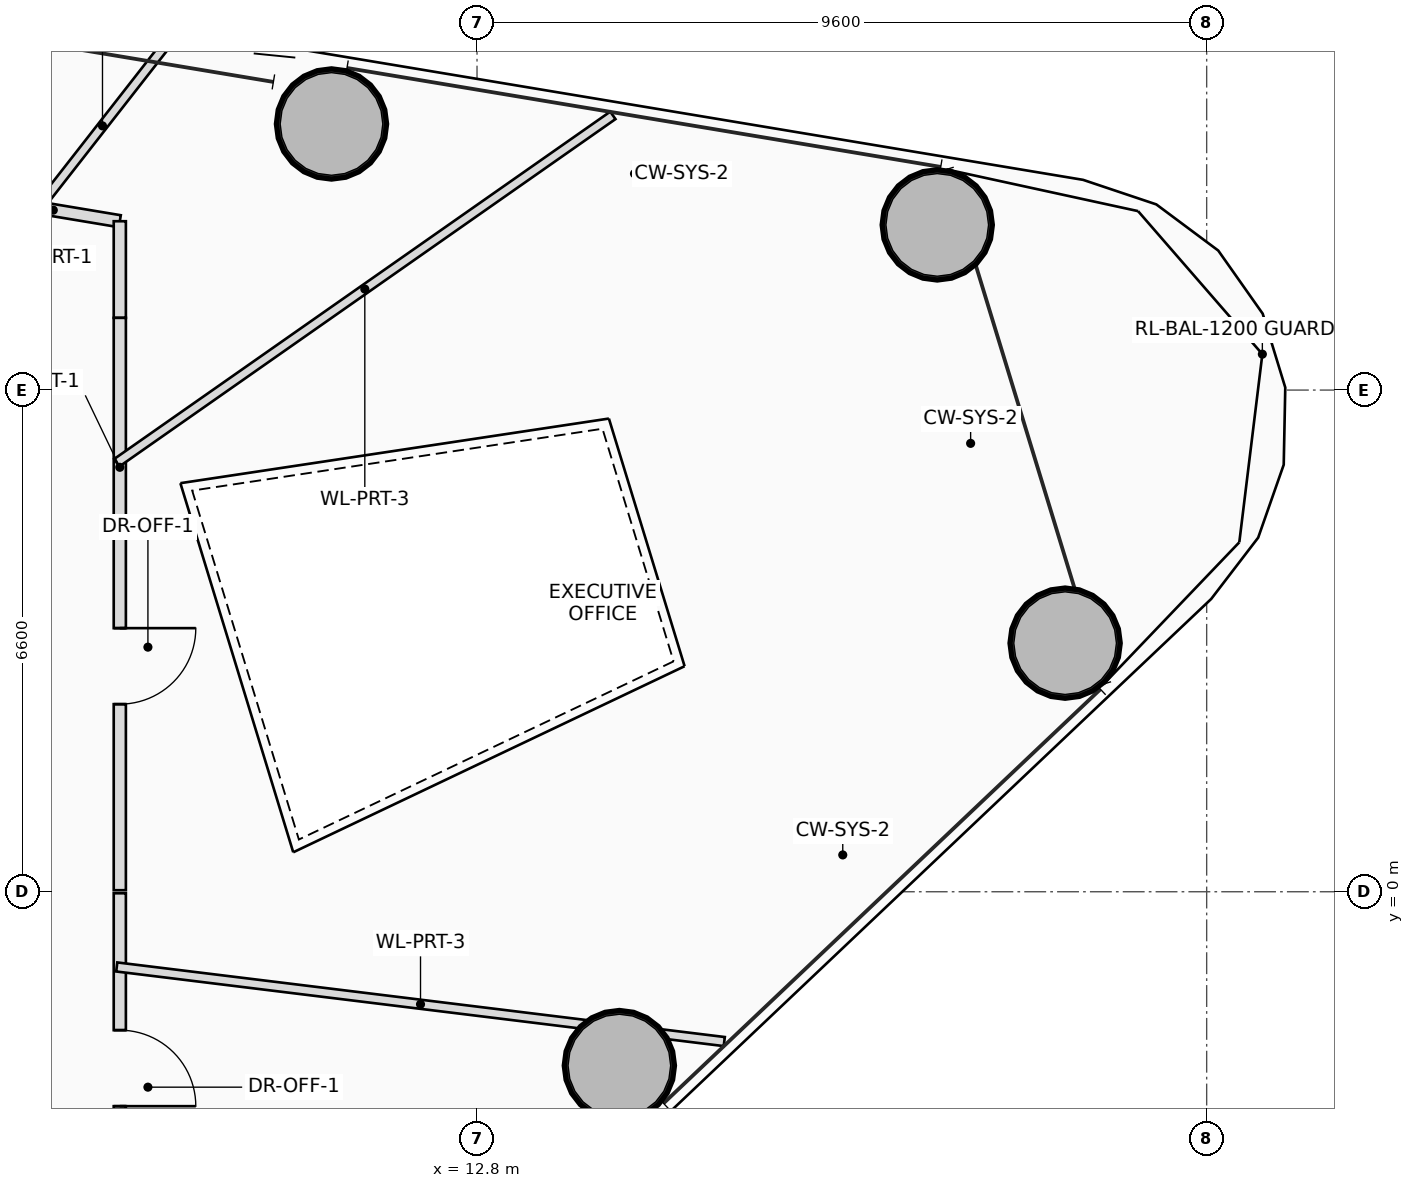
"""IFC4 building model, lengths in metres.
Left out: names, types, materials, properties, quantities, classifications, styles, units other than length and angle.
Written with IfcOpenShell. Run it as: python <this file> out.ifc"""

import sys

from ifc_helpers import new_model, si_unit, direction, frame, frame_2d, origin, origin_2d, place, context, subcontext, project, spatial, rectangle, hollow_circle, extrude, source, transform, mapped, element, fill, save


model = new_model("IFC4")
c1 = context("Model", 3, precision=1e-05, world=origin(), true_north=direction((0.0, 1.0)))
c2 = subcontext(c1, "Body", "Model", "MODEL_VIEW")
j1 = project(units=[si_unit("LENGTHUNIT", "METRE"), si_unit("PLANEANGLEUNIT", "RADIAN")], contexts=[c1])
p1 = place(None, origin())
s1 = spatial("IfcSite", under=j1, at=p1, CompositionType="ELEMENT")
p2 = place(p1, origin())
s2 = spatial("IfcBuilding", under=s1, at=p2, CompositionType="ELEMENT")
p3 = place(p2, frame((0.0, 0.0, 108.65)))
s3 = spatial("IfcBuildingStorey", under=s2, at=p3, CompositionType="ELEMENT", Elevation=108.65)
m1 = source(origin(), c2, "Body", "SweptSolid", [
    extrude(hollow_circle(Radius=0.725, WallThickness=0.05, at=origin_2d()), origin(), (0.0, 0.0, 1.0), 3.75),
])
for number, where, z_axis, x_axis in (
    (1, (14.673, -2.287, 0.0), (0.0, 0.0, 1.0), (1.0, 0.0, 0.0)),
    (2, (20.538, 3.271, 0.0), (0.0, 0.0, 1.0), (1.0, 0.0, 0.0)),
    (3, (18.855, 8.773, 0.0), (0.0, 0.0, 1.0), (1.0, 0.0, 0.0)),
    (4, (10.885, 10.101, 0.0), (0.0, 0.0, 1.0), (1.0, 0.0, 0.0)),
):
    element("IfcColumn", number, at=place(p3, frame(where, z_axis=z_axis, x_axis=x_axis)), inside=s3, PredefinedType="COLUMN", context=c2, shape_type="MappedRepresentation", body=[
        mapped(m1, transform((0.0, 0.0, 0.0), scale=1.0)),
    ])
p4 = place(p3, frame((6.35, 9.113, 0.0), z_axis=(0.0, 0.0, 1.0), x_axis=(0.986386484459, -0.164443617317, 0.0)))
e5 = element("IfcWall", 5, at=p4, inside=s3, PredefinedType="PARTITIONING", context=c2, shape_type="SweptSolid", body=[
    extrude(rectangle(XDim=1.774, YDim=0.16, at=frame_2d((0.887, 0.0))), origin(), (0.0, 0.0, 1.0), 3.2),
])
p5 = place(p3, frame((8.1, 8.821, 0.0), z_axis=(0.0, 0.0, 1.0), x_axis=(0.0, -1.0, 0.0)))
e6 = element("IfcWall", 6, at=p5, inside=s3, PredefinedType="PARTITIONING", context=c2, shape_type="SweptSolid", body=[
    extrude(rectangle(XDim=1.271, YDim=0.16, at=frame_2d((0.636, 0.0))), origin(), (0.0, 0.0, 1.0), 2.85),
])
p6 = place(p3, frame((8.1, 7.55, 0.0), z_axis=(0.0, 0.0, 1.0), x_axis=(0.0, -1.0, 0.0)))
e7 = element("IfcWall", 7, at=p6, inside=s3, PredefinedType="PARTITIONING", context=c2, shape_type="SweptSolid", body=[
    extrude(rectangle(XDim=7.53, YDim=0.16, at=frame_2d((3.765, 0.0))), origin(), (0.0, 0.0, 1.0), 2.85),
])
p7 = place(p6, frame((4.082, 0.0, 0.0)))
e8 = element("IfcOpeningElement", 8, at=p7, cuts=e7, PredefinedType="OPENING", context=c2, shape_type="SweptSolid", body=[
    extrude(rectangle(XDim=1.0, YDim=2.25, at=frame_2d((0.5, 1.125))), frame((0.0, 0.09, 0.0), z_axis=(0.0, -1.0, 0.0), x_axis=(1.0, 0.0, 0.0)), (0.0, 0.0, 1.0), 0.18),
])
p8 = place(p3, frame((8.1, -0.02, 0.0), z_axis=(0.0, 0.0, 1.0), x_axis=(0.0, -1.0, 0.0)))
e9 = element("IfcWall", 9, at=p8, inside=s3, PredefinedType="PARTITIONING", context=c2, shape_type="SweptSolid", body=[
    extrude(rectangle(XDim=6.126, YDim=0.16, at=frame_2d((3.063, 0.0))), origin(), (0.0, 0.0, 1.0), 2.85),
])
p9 = place(p8, frame((1.801, 0.0, 0.0)))
e10 = element("IfcOpeningElement", 10, at=p9, cuts=e9, PredefinedType="OPENING", context=c2, shape_type="SweptSolid", body=[
    extrude(rectangle(XDim=1.0, YDim=2.25, at=frame_2d((0.5, 1.125))), frame((0.0, 0.09, 0.0), z_axis=(0.0, -1.0, 0.0), x_axis=(1.0, 0.0, 0.0)), (0.0, 0.0, 1.0), 0.18),
])
p10 = place(p8, frame((4.284, 0.0, 0.0)))
e11 = element("IfcOpeningElement", 11, at=p10, cuts=e9, PredefinedType="OPENING", context=c2, shape_type="SweptSolid", body=[
    extrude(rectangle(XDim=1.0, YDim=2.25, at=frame_2d((0.5, 1.125))), frame((0.0, 0.09, 0.0), z_axis=(0.0, -1.0, 0.0), x_axis=(1.0, 0.0, 0.0)), (0.0, 0.0, 1.0), 0.18),
])
p11 = place(p3, frame((8.06, -0.99, 0.0), z_axis=(0.0, 0.0, 1.0), x_axis=(0.99254191086, -0.121903876831, 0.0)))
e12 = element("IfcWall", 12, at=p11, inside=s3, PredefinedType="PARTITIONING", context=c2, shape_type="SweptSolid", body=[
    extrude(rectangle(XDim=8.053, YDim=0.12, at=frame_2d((4.026, 0.0))), origin(), (0.0, 0.0, 1.0), 2.85),
])
p12 = place(p3, frame((8.06, 5.644, 0.0), z_axis=(0.0, 0.0, 1.0), x_axis=(0.819162822725, 0.573561042841, 0.0)))
e13 = element("IfcWall", 13, at=p12, inside=s3, PredefinedType="PARTITIONING", context=c2, shape_type="SweptSolid", body=[
    extrude(rectangle(XDim=7.968, YDim=0.12, at=frame_2d((3.984, 0.0))), origin(), (0.0, 0.0, 1.0), 2.85),
])
p13 = place(p3, frame((7.003, 8.964, 0.0), z_axis=(0.0, 0.0, 1.0), x_axis=(0.615657467661, 0.788013884721, 0.0)))
e14 = element("IfcWall", 14, at=p13, inside=s3, PredefinedType="PARTITIONING", context=c2, shape_type="SweptSolid", body=[
    extrude(rectangle(XDim=2.823, YDim=0.12, at=frame_2d((1.412, 0.0))), origin(), (0.0, 0.0, 1.0), 3.01),
])
p14 = place(p7, origin())
e15 = element("IfcDoor", 15, at=p14, inside=s3, OperationType="SINGLE_SWING_LEFT", PredefinedType="DOOR", context=c2, shape_type="SweptSolid", body=[
    extrude(rectangle(XDim=1.0, YDim=2.25, at=frame_2d((0.5, 1.125))), frame((0.0, 0.025, 0.0), z_axis=(0.0, -1.0, 0.0), x_axis=(1.0, 0.0, 0.0)), (0.0, 0.0, 1.0), 0.05),
])
fill(e8, e15)
p15 = place(p9, origin())
e16 = element("IfcDoor", 16, at=p15, inside=s3, OperationType="SINGLE_SWING_RIGHT", PredefinedType="DOOR", context=c2, shape_type="SweptSolid", body=[
    extrude(rectangle(XDim=1.0, YDim=2.25, at=frame_2d((0.5, 1.125))), frame((0.0, 0.025, 0.0), z_axis=(0.0, -1.0, 0.0), x_axis=(1.0, 0.0, 0.0)), (0.0, 0.0, 1.0), 0.05),
])
fill(e10, e16)
save(model, sys.argv[1])
